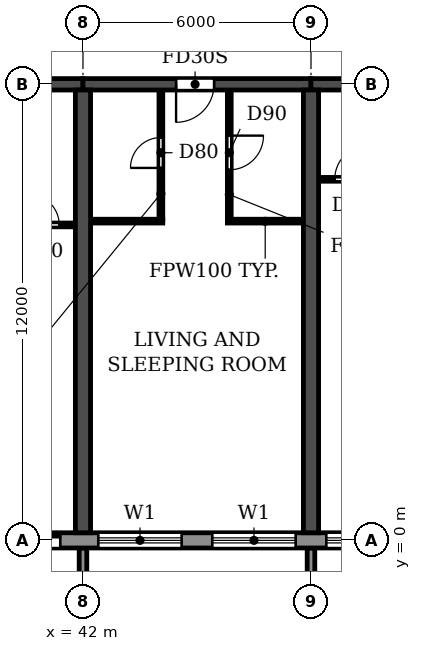
"""IFC4 building model, lengths in metres.
Left out: names, types, materials, properties, quantities, classifications, styles, units other than length and angle.
Written with IfcOpenShell. Run it as: python <this file> out.ifc"""

import sys

from ifc_helpers import new_model, si_unit, direction, frame, frame_2d, origin, place, context, subcontext, project, spatial, polyline, rectangle, outline, extrude, source, transform, mapped, element, fill, save


model = new_model("IFC4")
c1 = context("Model", 3, precision=1e-05, world=origin(), true_north=direction((0.0, 1.0)))
c2 = subcontext(c1, "Body", "Model", "MODEL_VIEW")
j1 = project(units=[si_unit("LENGTHUNIT", "METRE"), si_unit("PLANEANGLEUNIT", "RADIAN")], contexts=[c1])
p1 = place(None, origin())
s1 = spatial("IfcSite", under=j1, at=p1, CompositionType="ELEMENT")
p2 = place(p1, origin())
s2 = spatial("IfcBuilding", under=s1, at=p2, CompositionType="ELEMENT")
p3 = place(p2, frame((0.0, 0.0, 43.2)))
s3 = spatial("IfcBuildingStorey", under=s2, at=p3, CompositionType="ELEMENT", Elevation=43.2)
for number, where, z_axis, x_axis in (
    (1, (42.0, 0.2, 0.0), (0.0, 0.0, 1.0), (0.0, 1.0, 0.0)),
    (2, (48.0, 0.2, 0.0), (0.0, 0.0, 1.0), (0.0, 1.0, 0.0)),
):
    element("IfcWall", number, at=place(p3, frame(where, z_axis=z_axis, x_axis=x_axis)), inside=s3, PredefinedType="SHEAR", context=c2, shape_type="SweptSolid", body=[
        extrude(rectangle(XDim=11.65, YDim=0.4, at=frame_2d((5.825, 0.0))), origin(), (0.0, 0.0, 1.0), 3.05),
    ])
p4 = place(p3, frame((36.0, 12.0, 0.0), z_axis=(0.0, 0.0, 1.0), x_axis=(1.0, 0.0, 0.0)))
e3 = element("IfcWall", 3, at=p4, inside=s3, PredefinedType="SHEAR", context=c2, shape_type="SweptSolid", body=[
    extrude(rectangle(XDim=6.0, YDim=0.3, at=frame_2d((3.0, 0.0))), origin(), (0.0, 0.0, 1.0), 2.45),
])
p5 = place(p4, frame((2.55, 0.0, 0.0)))
e4 = element("IfcOpeningElement", 4, at=p5, cuts=e3, PredefinedType="OPENING", context=c2, shape_type="SweptSolid", body=[
    extrude(rectangle(XDim=1.0, YDim=2.1, at=frame_2d((0.5, 1.05))), frame((0.0, 0.16, 0.0), z_axis=(0.0, -1.0, 0.0), x_axis=(1.0, 0.0, 0.0)), (0.0, 0.0, 1.0), 0.32),
])
p6 = place(p3, frame((42.0, 12.0, 0.0), z_axis=(0.0, 0.0, 1.0), x_axis=(1.0, 0.0, 0.0)))
e5 = element("IfcWall", 5, at=p6, inside=s3, PredefinedType="SHEAR", context=c2, shape_type="SweptSolid", body=[
    extrude(rectangle(XDim=6.0, YDim=0.3, at=frame_2d((3.0, 0.0))), origin(), (0.0, 0.0, 1.0), 2.45),
])
p7 = place(p6, frame((2.45, 0.0, 0.0)))
e6 = element("IfcOpeningElement", 6, at=p7, cuts=e5, PredefinedType="OPENING", context=c2, shape_type="SweptSolid", body=[
    extrude(rectangle(XDim=1.0, YDim=2.1, at=frame_2d((0.5, 1.05))), frame((0.0, 0.16, 0.0), z_axis=(0.0, -1.0, 0.0), x_axis=(1.0, 0.0, 0.0)), (0.0, 0.0, 1.0), 0.32),
])
p8 = place(p3, frame((48.0, 12.0, 0.0), z_axis=(0.0, 0.0, 1.0), x_axis=(1.0, 0.0, 0.0)))
e7 = element("IfcWall", 7, at=p8, inside=s3, PredefinedType="SHEAR", context=c2, shape_type="SweptSolid", body=[
    extrude(rectangle(XDim=6.0, YDim=0.3, at=frame_2d((3.0, 0.0))), origin(), (0.0, 0.0, 1.0), 2.45),
])
p9 = place(p8, frame((2.55, 0.0, 0.0)))
e8 = element("IfcOpeningElement", 8, at=p9, cuts=e7, PredefinedType="OPENING", context=c2, shape_type="SweptSolid", body=[
    extrude(rectangle(XDim=1.0, YDim=2.1, at=frame_2d((0.5, 1.05))), frame((0.0, 0.16, 0.0), z_axis=(0.0, -1.0, 0.0), x_axis=(1.0, 0.0, 0.0)), (0.0, 0.0, 1.0), 0.32),
])
p10 = place(p3, frame((4.683, 0.0, 0.0), z_axis=(0.0, 0.0, 1.0), x_axis=(1.0, 0.0, 0.0)))
e9 = element("IfcWall", 9, at=p10, inside=s3, PredefinedType="STANDARD", context=c2, shape_type="SweptSolid", body=[
    extrude(rectangle(XDim=92.634, YDim=0.4, at=frame_2d((46.317, 0.0))), origin(), (0.0, 0.0, 1.0), 3.05),
])
p11 = place(p10, frame((1.717, 0.0, 0.9)))
e10 = element("IfcOpeningElement", 10, at=p11, cuts=e9, PredefinedType="OPENING", context=c2, shape_type="SweptSolid", body=[
    extrude(rectangle(XDim=2.2, YDim=1.5, at=frame_2d((1.1, 0.75))), frame((0.0, 0.21, 0.0), z_axis=(0.0, -1.0, 0.0), x_axis=(1.0, 0.0, 0.0)), (0.0, 0.0, 1.0), 0.42),
])
p12 = place(p10, frame((4.717, 0.0, 0.9)))
e11 = element("IfcOpeningElement", 11, at=p12, cuts=e9, PredefinedType="OPENING", context=c2, shape_type="SweptSolid", body=[
    extrude(rectangle(XDim=2.2, YDim=1.5, at=frame_2d((1.1, 0.75))), frame((0.0, 0.21, 0.0), z_axis=(0.0, -1.0, 0.0), x_axis=(1.0, 0.0, 0.0)), (0.0, 0.0, 1.0), 0.42),
])
p13 = place(p10, frame((7.717, 0.0, 0.9)))
e12 = element("IfcOpeningElement", 12, at=p13, cuts=e9, PredefinedType="OPENING", context=c2, shape_type="SweptSolid", body=[
    extrude(rectangle(XDim=2.2, YDim=1.5, at=frame_2d((1.1, 0.75))), frame((0.0, 0.21, 0.0), z_axis=(0.0, -1.0, 0.0), x_axis=(1.0, 0.0, 0.0)), (0.0, 0.0, 1.0), 0.42),
])
p14 = place(p10, frame((10.917, 0.0, 0.0)))
e13 = element("IfcOpeningElement", 13, at=p14, cuts=e9, PredefinedType="OPENING", context=c2, shape_type="SweptSolid", body=[
    extrude(rectangle(XDim=1.8, YDim=2.4, at=frame_2d((0.9, 1.2))), frame((0.0, 0.21, 0.0), z_axis=(0.0, -1.0, 0.0), x_axis=(1.0, 0.0, 0.0)), (0.0, 0.0, 1.0), 0.42),
])
p15 = place(p10, frame((13.717, 0.0, 0.9)))
e14 = element("IfcOpeningElement", 14, at=p15, cuts=e9, PredefinedType="OPENING", context=c2, shape_type="SweptSolid", body=[
    extrude(rectangle(XDim=2.2, YDim=1.5, at=frame_2d((1.1, 0.75))), frame((0.0, 0.21, 0.0), z_axis=(0.0, -1.0, 0.0), x_axis=(1.0, 0.0, 0.0)), (0.0, 0.0, 1.0), 0.42),
])
p16 = place(p10, frame((16.717, 0.0, 0.9)))
e15 = element("IfcOpeningElement", 15, at=p16, cuts=e9, PredefinedType="OPENING", context=c2, shape_type="SweptSolid", body=[
    extrude(rectangle(XDim=2.2, YDim=1.5, at=frame_2d((1.1, 0.75))), frame((0.0, 0.21, 0.0), z_axis=(0.0, -1.0, 0.0), x_axis=(1.0, 0.0, 0.0)), (0.0, 0.0, 1.0), 0.42),
])
p17 = place(p10, frame((19.917, 0.0, 0.0)))
e16 = element("IfcOpeningElement", 16, at=p17, cuts=e9, PredefinedType="OPENING", context=c2, shape_type="SweptSolid", body=[
    extrude(rectangle(XDim=1.8, YDim=2.4, at=frame_2d((0.9, 1.2))), frame((0.0, 0.21, 0.0), z_axis=(0.0, -1.0, 0.0), x_axis=(1.0, 0.0, 0.0)), (0.0, 0.0, 1.0), 0.42),
])
p18 = place(p10, frame((22.717, 0.0, 0.9)))
e17 = element("IfcOpeningElement", 17, at=p18, cuts=e9, PredefinedType="OPENING", context=c2, shape_type="SweptSolid", body=[
    extrude(rectangle(XDim=2.2, YDim=1.5, at=frame_2d((1.1, 0.75))), frame((0.0, 0.21, 0.0), z_axis=(0.0, -1.0, 0.0), x_axis=(1.0, 0.0, 0.0)), (0.0, 0.0, 1.0), 0.42),
])
p19 = place(p10, frame((25.717, 0.0, 0.9)))
e18 = element("IfcOpeningElement", 18, at=p19, cuts=e9, PredefinedType="OPENING", context=c2, shape_type="SweptSolid", body=[
    extrude(rectangle(XDim=2.2, YDim=1.5, at=frame_2d((1.1, 0.75))), frame((0.0, 0.21, 0.0), z_axis=(0.0, -1.0, 0.0), x_axis=(1.0, 0.0, 0.0)), (0.0, 0.0, 1.0), 0.42),
])
p20 = place(p10, frame((28.717, 0.0, 0.9)))
e19 = element("IfcOpeningElement", 19, at=p20, cuts=e9, PredefinedType="OPENING", context=c2, shape_type="SweptSolid", body=[
    extrude(rectangle(XDim=2.2, YDim=1.5, at=frame_2d((1.1, 0.75))), frame((0.0, 0.21, 0.0), z_axis=(0.0, -1.0, 0.0), x_axis=(1.0, 0.0, 0.0)), (0.0, 0.0, 1.0), 0.42),
])
p21 = place(p10, frame((31.717, 0.0, 0.9)))
e20 = element("IfcOpeningElement", 20, at=p21, cuts=e9, PredefinedType="OPENING", context=c2, shape_type="SweptSolid", body=[
    extrude(rectangle(XDim=2.2, YDim=1.5, at=frame_2d((1.1, 0.75))), frame((0.0, 0.21, 0.0), z_axis=(0.0, -1.0, 0.0), x_axis=(1.0, 0.0, 0.0)), (0.0, 0.0, 1.0), 0.42),
])
p22 = place(p10, frame((34.917, 0.0, 0.0)))
e21 = element("IfcOpeningElement", 21, at=p22, cuts=e9, PredefinedType="OPENING", context=c2, shape_type="SweptSolid", body=[
    extrude(rectangle(XDim=1.8, YDim=2.4, at=frame_2d((0.9, 1.2))), frame((0.0, 0.21, 0.0), z_axis=(0.0, -1.0, 0.0), x_axis=(1.0, 0.0, 0.0)), (0.0, 0.0, 1.0), 0.42),
])
p23 = place(p10, frame((37.717, 0.0, 0.9)))
e22 = element("IfcOpeningElement", 22, at=p23, cuts=e9, PredefinedType="OPENING", context=c2, shape_type="SweptSolid", body=[
    extrude(rectangle(XDim=2.2, YDim=1.5, at=frame_2d((1.1, 0.75))), frame((0.0, 0.21, 0.0), z_axis=(0.0, -1.0, 0.0), x_axis=(1.0, 0.0, 0.0)), (0.0, 0.0, 1.0), 0.42),
])
p24 = place(p10, frame((40.717, 0.0, 0.9)))
e23 = element("IfcOpeningElement", 23, at=p24, cuts=e9, PredefinedType="OPENING", context=c2, shape_type="SweptSolid", body=[
    extrude(rectangle(XDim=2.2, YDim=1.5, at=frame_2d((1.1, 0.75))), frame((0.0, 0.21, 0.0), z_axis=(0.0, -1.0, 0.0), x_axis=(1.0, 0.0, 0.0)), (0.0, 0.0, 1.0), 0.42),
])
p25 = place(p10, frame((43.717, 0.0, 0.9)))
e24 = element("IfcOpeningElement", 24, at=p25, cuts=e9, PredefinedType="OPENING", context=c2, shape_type="SweptSolid", body=[
    extrude(rectangle(XDim=2.2, YDim=1.5, at=frame_2d((1.1, 0.75))), frame((0.0, 0.21, 0.0), z_axis=(0.0, -1.0, 0.0), x_axis=(1.0, 0.0, 0.0)), (0.0, 0.0, 1.0), 0.42),
])
p26 = place(p10, frame((46.917, 0.0, 0.0)))
e25 = element("IfcOpeningElement", 25, at=p26, cuts=e9, PredefinedType="OPENING", context=c2, shape_type="SweptSolid", body=[
    extrude(rectangle(XDim=1.8, YDim=2.4, at=frame_2d((0.9, 1.2))), frame((0.0, 0.21, 0.0), z_axis=(0.0, -1.0, 0.0), x_axis=(1.0, 0.0, 0.0)), (0.0, 0.0, 1.0), 0.42),
])
p27 = place(p10, frame((49.717, 0.0, 0.9)))
e26 = element("IfcOpeningElement", 26, at=p27, cuts=e9, PredefinedType="OPENING", context=c2, shape_type="SweptSolid", body=[
    extrude(rectangle(XDim=2.2, YDim=1.5, at=frame_2d((1.1, 0.75))), frame((0.0, 0.21, 0.0), z_axis=(0.0, -1.0, 0.0), x_axis=(1.0, 0.0, 0.0)), (0.0, 0.0, 1.0), 0.42),
])
p28 = place(p10, frame((52.717, 0.0, 0.9)))
e27 = element("IfcOpeningElement", 27, at=p28, cuts=e9, PredefinedType="OPENING", context=c2, shape_type="SweptSolid", body=[
    extrude(rectangle(XDim=2.2, YDim=1.5, at=frame_2d((1.1, 0.75))), frame((0.0, 0.21, 0.0), z_axis=(0.0, -1.0, 0.0), x_axis=(1.0, 0.0, 0.0)), (0.0, 0.0, 1.0), 0.42),
])
p29 = place(p10, frame((55.717, 0.0, 0.9)))
e28 = element("IfcOpeningElement", 28, at=p29, cuts=e9, PredefinedType="OPENING", context=c2, shape_type="SweptSolid", body=[
    extrude(rectangle(XDim=2.2, YDim=1.5, at=frame_2d((1.1, 0.75))), frame((0.0, 0.21, 0.0), z_axis=(0.0, -1.0, 0.0), x_axis=(1.0, 0.0, 0.0)), (0.0, 0.0, 1.0), 0.42),
])
p30 = place(p10, frame((58.917, 0.0, 0.0)))
e29 = element("IfcOpeningElement", 29, at=p30, cuts=e9, PredefinedType="OPENING", context=c2, shape_type="SweptSolid", body=[
    extrude(rectangle(XDim=1.8, YDim=2.4, at=frame_2d((0.9, 1.2))), frame((0.0, 0.21, 0.0), z_axis=(0.0, -1.0, 0.0), x_axis=(1.0, 0.0, 0.0)), (0.0, 0.0, 1.0), 0.42),
])
p31 = place(p10, frame((61.717, 0.0, 0.9)))
e30 = element("IfcOpeningElement", 30, at=p31, cuts=e9, PredefinedType="OPENING", context=c2, shape_type="SweptSolid", body=[
    extrude(rectangle(XDim=2.2, YDim=1.5, at=frame_2d((1.1, 0.75))), frame((0.0, 0.21, 0.0), z_axis=(0.0, -1.0, 0.0), x_axis=(1.0, 0.0, 0.0)), (0.0, 0.0, 1.0), 0.42),
])
p32 = place(p10, frame((64.717, 0.0, 0.9)))
e31 = element("IfcOpeningElement", 31, at=p32, cuts=e9, PredefinedType="OPENING", context=c2, shape_type="SweptSolid", body=[
    extrude(rectangle(XDim=2.2, YDim=1.5, at=frame_2d((1.1, 0.75))), frame((0.0, 0.21, 0.0), z_axis=(0.0, -1.0, 0.0), x_axis=(1.0, 0.0, 0.0)), (0.0, 0.0, 1.0), 0.42),
])
p33 = place(p10, frame((67.717, 0.0, 0.9)))
e32 = element("IfcOpeningElement", 32, at=p33, cuts=e9, PredefinedType="OPENING", context=c2, shape_type="SweptSolid", body=[
    extrude(rectangle(XDim=2.2, YDim=1.5, at=frame_2d((1.1, 0.75))), frame((0.0, 0.21, 0.0), z_axis=(0.0, -1.0, 0.0), x_axis=(1.0, 0.0, 0.0)), (0.0, 0.0, 1.0), 0.42),
])
p34 = place(p10, frame((70.917, 0.0, 0.0)))
e33 = element("IfcOpeningElement", 33, at=p34, cuts=e9, PredefinedType="OPENING", context=c2, shape_type="SweptSolid", body=[
    extrude(rectangle(XDim=1.8, YDim=2.4, at=frame_2d((0.9, 1.2))), frame((0.0, 0.21, 0.0), z_axis=(0.0, -1.0, 0.0), x_axis=(1.0, 0.0, 0.0)), (0.0, 0.0, 1.0), 0.42),
])
p35 = place(p10, frame((73.717, 0.0, 0.9)))
e34 = element("IfcOpeningElement", 34, at=p35, cuts=e9, PredefinedType="OPENING", context=c2, shape_type="SweptSolid", body=[
    extrude(rectangle(XDim=2.2, YDim=1.5, at=frame_2d((1.1, 0.75))), frame((0.0, 0.21, 0.0), z_axis=(0.0, -1.0, 0.0), x_axis=(1.0, 0.0, 0.0)), (0.0, 0.0, 1.0), 0.42),
])
p36 = place(p10, frame((76.717, 0.0, 0.9)))
e35 = element("IfcOpeningElement", 35, at=p36, cuts=e9, PredefinedType="OPENING", context=c2, shape_type="SweptSolid", body=[
    extrude(rectangle(XDim=2.2, YDim=1.5, at=frame_2d((1.1, 0.75))), frame((0.0, 0.21, 0.0), z_axis=(0.0, -1.0, 0.0), x_axis=(1.0, 0.0, 0.0)), (0.0, 0.0, 1.0), 0.42),
])
p37 = place(p10, frame((79.717, 0.0, 0.9)))
e36 = element("IfcOpeningElement", 36, at=p37, cuts=e9, PredefinedType="OPENING", context=c2, shape_type="SweptSolid", body=[
    extrude(rectangle(XDim=2.2, YDim=1.5, at=frame_2d((1.1, 0.75))), frame((0.0, 0.21, 0.0), z_axis=(0.0, -1.0, 0.0), x_axis=(1.0, 0.0, 0.0)), (0.0, 0.0, 1.0), 0.42),
])
p38 = place(p10, frame((82.917, 0.0, 0.0)))
e37 = element("IfcOpeningElement", 37, at=p38, cuts=e9, PredefinedType="OPENING", context=c2, shape_type="SweptSolid", body=[
    extrude(rectangle(XDim=1.8, YDim=2.4, at=frame_2d((0.9, 1.2))), frame((0.0, 0.21, 0.0), z_axis=(0.0, -1.0, 0.0), x_axis=(1.0, 0.0, 0.0)), (0.0, 0.0, 1.0), 0.42),
])
p39 = place(p10, frame((85.717, 0.0, 0.9)))
e38 = element("IfcOpeningElement", 38, at=p39, cuts=e9, PredefinedType="OPENING", context=c2, shape_type="SweptSolid", body=[
    extrude(rectangle(XDim=2.2, YDim=1.5, at=frame_2d((1.1, 0.75))), frame((0.0, 0.21, 0.0), z_axis=(0.0, -1.0, 0.0), x_axis=(1.0, 0.0, 0.0)), (0.0, 0.0, 1.0), 0.42),
])
p40 = place(p10, frame((88.717, 0.0, 0.9)))
e39 = element("IfcOpeningElement", 39, at=p40, cuts=e9, PredefinedType="OPENING", context=c2, shape_type="SweptSolid", body=[
    extrude(rectangle(XDim=2.2, YDim=1.5, at=frame_2d((1.1, 0.75))), frame((0.0, 0.21, 0.0), z_axis=(0.0, -1.0, 0.0), x_axis=(1.0, 0.0, 0.0)), (0.0, 0.0, 1.0), 0.42),
])
m1 = source(origin(), c2, "Body", "SweptSolid", [
    extrude(outline(polyline([(0.0, 0.0), (0.2, 0.0), (0.2, 1.65), (0.0, 1.65), (0.0, 0.0)])), origin(), (0.0, 0.0, 1.0), 3.1),
])
for number, where in (
    (40, (41.9, -1.85, 0.0)),
    (41, (47.9, -1.85, 0.0)),
):
    element("IfcWall", number, at=place(p3, frame(where)), inside=s3, PredefinedType="STANDARD", context=c2, shape_type="MappedRepresentation", body=[
        mapped(m1, transform((0.0, 0.0, 0.0))),
    ])
p41 = place(p3, frame((39.9, 8.3, 0.0), z_axis=(0.0, 0.0, 1.0), x_axis=(1.0, 0.0, 0.0)))
e42 = element("IfcWall", 42, at=p41, inside=s3, PredefinedType="PARTITIONING", context=c2, shape_type="SweptSolid", body=[
    extrude(rectangle(XDim=1.89, YDim=0.1, at=frame_2d((0.945, 0.0))), origin(), (0.0, 0.0, 1.0), 3.05),
])
p42 = place(p41, frame((0.675, 0.0, 0.0)))
e43 = element("IfcOpeningElement", 43, at=p42, cuts=e42, PredefinedType="OPENING", context=c2, shape_type="SweptSolid", body=[
    extrude(rectangle(XDim=0.8, YDim=2.1, at=frame_2d((0.4, 1.05))), frame((0.0, 0.06, 0.0), z_axis=(0.0, -1.0, 0.0), x_axis=(1.0, 0.0, 0.0)), (0.0, 0.0, 1.0), 0.12),
])
p43 = place(p3, frame((42.21, 8.4, 0.0), z_axis=(0.0, 0.0, 1.0), x_axis=(1.0, 0.0, 0.0)))
e44 = element("IfcWall", 44, at=p43, inside=s3, PredefinedType="PARTITIONING", context=c2, shape_type="SweptSolid", body=[
    extrude(rectangle(XDim=1.89, YDim=0.1, at=frame_2d((0.945, 0.0))), origin(), (0.0, 0.0, 1.0), 3.05),
])
p44 = place(p3, frame((45.8, 8.4, 0.0), z_axis=(0.0, 0.0, 1.0), x_axis=(1.0, 0.0, 0.0)))
e45 = element("IfcWall", 45, at=p44, inside=s3, PredefinedType="PARTITIONING", context=c2, shape_type="SweptSolid", body=[
    extrude(rectangle(XDim=1.99, YDim=0.1, at=frame_2d((0.995, 0.0))), origin(), (0.0, 0.0, 1.0), 3.05),
])
p45 = place(p3, frame((48.21, 9.5, 0.0), z_axis=(0.0, 0.0, 1.0), x_axis=(1.0, 0.0, 0.0)))
e46 = element("IfcWall", 46, at=p45, inside=s3, PredefinedType="PARTITIONING", context=c2, shape_type="SweptSolid", body=[
    extrude(rectangle(XDim=1.99, YDim=0.1, at=frame_2d((0.995, 0.0))), origin(), (0.0, 0.0, 1.0), 3.05),
])
p46 = place(p45, frame((0.415, 0.0, 0.0)))
e47 = element("IfcOpeningElement", 47, at=p46, cuts=e46, PredefinedType="OPENING", context=c2, shape_type="SweptSolid", body=[
    extrude(rectangle(XDim=0.9, YDim=2.1, at=frame_2d((0.45, 1.05))), frame((0.0, 0.06, 0.0), z_axis=(0.0, -1.0, 0.0), x_axis=(1.0, 0.0, 0.0)), (0.0, 0.0, 1.0), 0.12),
])
p47 = place(p3, frame((44.05, 8.45, 0.0), z_axis=(0.0, 0.0, 1.0), x_axis=(0.0, 1.0, 0.0)))
e48 = element("IfcWall", 48, at=p47, inside=s3, PredefinedType="PARTITIONING", context=c2, shape_type="SweptSolid", body=[
    extrude(rectangle(XDim=3.39, YDim=0.1, at=frame_2d((1.695, 0.0))), origin(), (0.0, 0.0, 1.0), 3.05),
])
p48 = place(p47, frame((1.35, 0.0, 0.0)))
e49 = element("IfcOpeningElement", 49, at=p48, cuts=e48, PredefinedType="OPENING", context=c2, shape_type="SweptSolid", body=[
    extrude(rectangle(XDim=0.8, YDim=2.1, at=frame_2d((0.4, 1.05))), frame((0.0, 0.06, 0.0), z_axis=(0.0, -1.0, 0.0), x_axis=(1.0, 0.0, 0.0)), (0.0, 0.0, 1.0), 0.12),
])
p49 = place(p3, frame((45.85, 8.45, 0.0), z_axis=(0.0, 0.0, 1.0), x_axis=(0.0, 1.0, 0.0)))
e50 = element("IfcWall", 50, at=p49, inside=s3, PredefinedType="PARTITIONING", context=c2, shape_type="SweptSolid", body=[
    extrude(rectangle(XDim=3.39, YDim=0.1, at=frame_2d((1.695, 0.0))), origin(), (0.0, 0.0, 1.0), 3.05),
])
p50 = place(p49, frame((1.3, 0.0, 0.0)))
e51 = element("IfcOpeningElement", 51, at=p50, cuts=e50, PredefinedType="OPENING", context=c2, shape_type="SweptSolid", body=[
    extrude(rectangle(XDim=0.9, YDim=2.1, at=frame_2d((0.45, 1.05))), frame((0.0, 0.06, 0.0), z_axis=(0.0, -1.0, 0.0), x_axis=(1.0, 0.0, 0.0)), (0.0, 0.0, 1.0), 0.12),
])
p51 = place(p22, origin())
e52 = element("IfcDoor", 52, at=p51, inside=s3, OperationType="DOUBLE_DOOR_SLIDING", PredefinedType="DOOR", context=c2, shape_type="SweptSolid", body=[
    extrude(rectangle(XDim=1.8, YDim=2.4, at=frame_2d((0.9, 1.2))), frame((0.0, 0.025, 0.0), z_axis=(0.0, -1.0, 0.0), x_axis=(1.0, 0.0, 0.0)), (0.0, 0.0, 1.0), 0.05),
])
fill(e21, e52)
p52 = place(p23, origin())
e53 = element("IfcWindow", 53, at=p52, inside=s3, PartitioningType="DOUBLE_PANEL_HORIZONTAL", PredefinedType="WINDOW", context=c2, shape_type="SweptSolid", body=[
    extrude(rectangle(XDim=2.2, YDim=1.5, at=frame_2d((1.1, 0.75))), frame((0.0, 0.03, 0.0), z_axis=(0.0, -1.0, 0.0), x_axis=(1.0, 0.0, 0.0)), (0.0, 0.0, 1.0), 0.06),
])
fill(e22, e53)
p53 = place(p24, origin())
e54 = element("IfcWindow", 54, at=p53, inside=s3, PartitioningType="DOUBLE_PANEL_HORIZONTAL", PredefinedType="WINDOW", context=c2, shape_type="SweptSolid", body=[
    extrude(rectangle(XDim=2.2, YDim=1.5, at=frame_2d((1.1, 0.75))), frame((0.0, 0.03, 0.0), z_axis=(0.0, -1.0, 0.0), x_axis=(1.0, 0.0, 0.0)), (0.0, 0.0, 1.0), 0.06),
])
fill(e23, e54)
p54 = place(p25, origin())
e55 = element("IfcWindow", 55, at=p54, inside=s3, PartitioningType="DOUBLE_PANEL_HORIZONTAL", PredefinedType="WINDOW", context=c2, shape_type="SweptSolid", body=[
    extrude(rectangle(XDim=2.2, YDim=1.5, at=frame_2d((1.1, 0.75))), frame((0.0, 0.03, 0.0), z_axis=(0.0, -1.0, 0.0), x_axis=(1.0, 0.0, 0.0)), (0.0, 0.0, 1.0), 0.06),
])
fill(e24, e55)
p55 = place(p42, origin())
e56 = element("IfcDoor", 56, at=p55, inside=s3, OperationType="SINGLE_SWING_LEFT", PredefinedType="DOOR", context=c2, shape_type="SweptSolid", body=[
    extrude(rectangle(XDim=0.8, YDim=2.1, at=frame_2d((0.4, 1.05))), frame((0.0, 0.025, 0.0), z_axis=(0.0, -1.0, 0.0), x_axis=(1.0, 0.0, 0.0)), (0.0, 0.0, 1.0), 0.05),
])
fill(e43, e56)
p56 = place(p48, origin())
e57 = element("IfcDoor", 57, at=p56, inside=s3, OperationType="SINGLE_SWING_LEFT", PredefinedType="DOOR", context=c2, shape_type="SweptSolid", body=[
    extrude(rectangle(XDim=0.8, YDim=2.1, at=frame_2d((0.4, 1.05))), frame((0.0, 0.025, 0.0), z_axis=(0.0, -1.0, 0.0), x_axis=(1.0, 0.0, 0.0)), (0.0, 0.0, 1.0), 0.05),
])
fill(e49, e57)
p57 = place(p7, frame((1.0, 0.0, 0.0), z_axis=(0.0, 0.0, 1.0), x_axis=(-1.0, 0.0, 0.0)))
e58 = element("IfcDoor", 58, at=p57, inside=s3, OperationType="SINGLE_SWING_RIGHT", PredefinedType="DOOR", context=c2, shape_type="SweptSolid", body=[
    extrude(rectangle(XDim=1.0, YDim=2.1, at=frame_2d((0.5, 1.05))), frame((0.0, 0.025, 0.0), z_axis=(0.0, -1.0, 0.0), x_axis=(1.0, 0.0, 0.0)), (0.0, 0.0, 1.0), 0.05),
])
fill(e6, e58)
p58 = place(p50, frame((0.9, 0.0, 0.0), z_axis=(0.0, 0.0, 1.0), x_axis=(-1.0, 0.0, 0.0)))
e59 = element("IfcDoor", 59, at=p58, inside=s3, OperationType="SINGLE_SWING_LEFT", PredefinedType="DOOR", context=c2, shape_type="SweptSolid", body=[
    extrude(rectangle(XDim=0.9, YDim=2.1, at=frame_2d((0.45, 1.05))), frame((0.0, 0.025, 0.0), z_axis=(0.0, -1.0, 0.0), x_axis=(1.0, 0.0, 0.0)), (0.0, 0.0, 1.0), 0.05),
])
fill(e51, e59)
p59 = place(p46, origin())
e60 = element("IfcDoor", 60, at=p59, inside=s3, OperationType="SINGLE_SWING_RIGHT", PredefinedType="DOOR", context=c2, shape_type="SweptSolid", body=[
    extrude(rectangle(XDim=0.9, YDim=2.1, at=frame_2d((0.45, 1.05))), frame((0.0, 0.025, 0.0), z_axis=(0.0, -1.0, 0.0), x_axis=(1.0, 0.0, 0.0)), (0.0, 0.0, 1.0), 0.05),
])
fill(e47, e60)
save(model, sys.argv[1])
